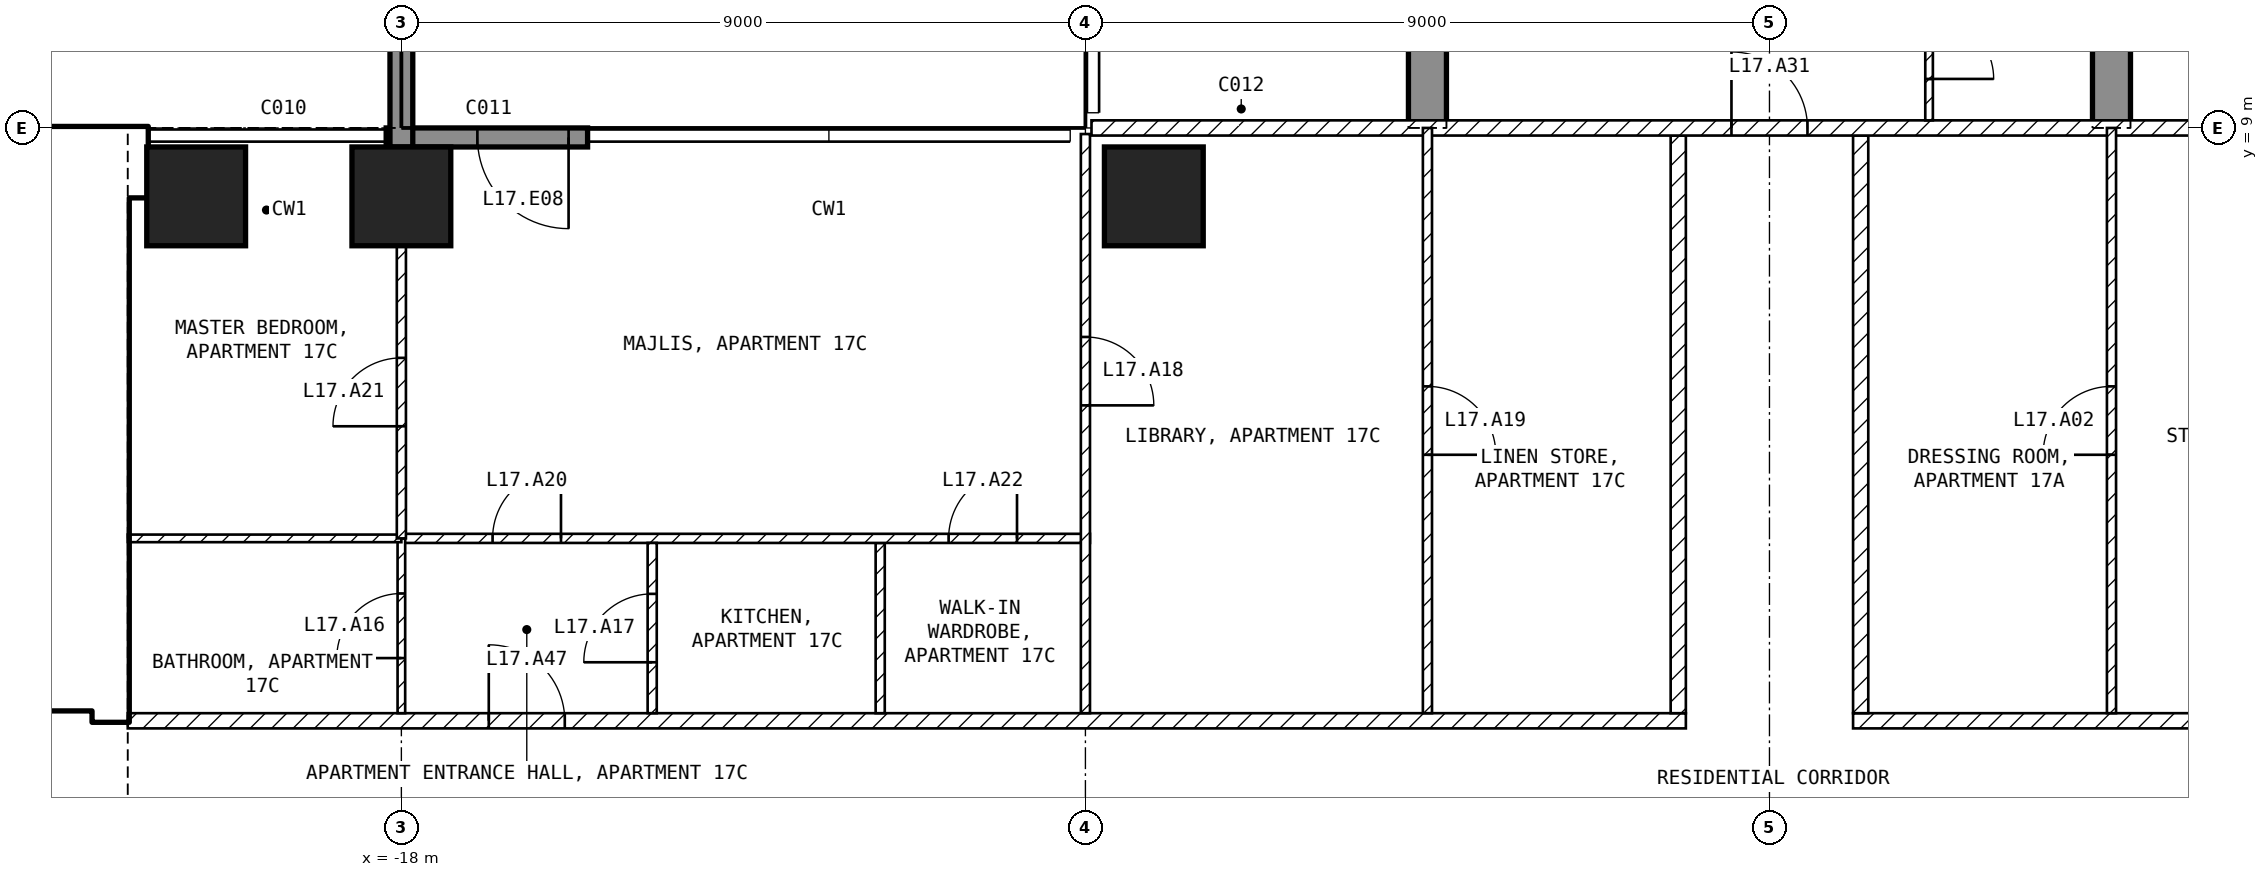
"""IFC4 building model, lengths in metres.
Left out: names, types, materials, properties, quantities, classifications, styles, units other than length and angle.
Written with IfcOpenShell. Run it as: python <this file> out.ifc"""

import sys

from ifc_helpers import new_model, si_unit, direction, frame, frame_2d, origin, origin_2d, place, context, subcontext, project, spatial, polyline, rectangle, outline, extrude, element, fill, save


model = new_model("IFC4")
c1 = context("Model", 3, precision=1e-05, world=origin(), true_north=direction((0.0, 1.0)))
c2 = subcontext(c1, "Body", "Model", "MODEL_VIEW")
j1 = project(units=[si_unit("LENGTHUNIT", "METRE"), si_unit("PLANEANGLEUNIT", "RADIAN")], contexts=[c1])
p1 = place(None, origin())
s1 = spatial("IfcSite", under=j1, at=p1, CompositionType="ELEMENT")
p2 = place(p1, origin())
s2 = spatial("IfcBuilding", under=s1, at=p2, CompositionType="ELEMENT")
p3 = place(p2, frame((0.0, 0.0, 78.5)))
s3 = spatial("IfcBuildingStorey", under=s2, at=p3, CompositionType="ELEMENT", Elevation=78.5)
for number, where, z_axis, x_axis in (
    (1, (-20.7, 8.1, -0.25), (0.0, 0.0, 1.0), (1.0, 0.0, 0.0)),
    (2, (-18.0, 8.1, -0.25), (0.0, 0.0, 1.0), (1.0, 0.0, 0.0)),
    (3, (-8.1, 8.1, -0.25), (0.0, 0.0, 1.0), (1.0, 0.0, 0.0)),
):
    element("IfcColumn", number, at=place(p3, frame(where, z_axis=z_axis, x_axis=x_axis)), inside=s3, PredefinedType="COLUMN", context=c2, shape_type="SweptSolid", body=[
        extrude(rectangle(XDim=1.3, YDim=1.3, at=origin_2d()), origin(), (0.0, 0.0, 1.0), 3.5),
    ])
for number, where, z_axis, x_axis in (
    (4, (-4.75, 9.0, -0.25), (1.0, 0.0, 0.0), (0.0, 1.0, 0.0)),
    (5, (4.25, 9.0, -0.25), (1.0, 0.0, 0.0), (0.0, 1.0, 0.0)),
):
    element("IfcWall", number, at=place(p3, frame(where, z_axis=z_axis, x_axis=x_axis)), inside=s3, PredefinedType="SHEAR", context=c2, shape_type="SweptSolid", body=[
        extrude(outline(polyline([(0.0, 0.0), (2.1, 0.0), (2.1, 2.65), (4.5, 2.65), (4.5, 0.0), (9.9, 0.0), (9.9, 2.65), (12.3, 2.65), (12.3, 0.0), (16.45, 0.0), (16.45, 3.5), (0.0, 3.5), (0.0, 0.0)])), origin(), (0.0, 0.0, 1.0), 0.5),
    ])
p4 = place(p3, frame((-15.55, 8.875, 0.0), z_axis=(0.0, 0.0, 1.0), x_axis=(-1.0, 0.0, 0.0)))
e6 = element("IfcWall", 6, at=p4, inside=s3, PredefinedType="SOLIDWALL", context=c2, shape_type="SweptSolid", body=[
    extrude(rectangle(XDim=2.65, YDim=0.25, at=frame_2d((1.325, 0.0))), origin(), (0.0, 0.0, 1.0), 3.25),
])
p5 = place(p4, frame((0.25, 0.0, 0.0)))
e7 = element("IfcOpeningElement", 7, at=p5, cuts=e6, PredefinedType="OPENING", context=c2, shape_type="SweptSolid", body=[
    extrude(rectangle(XDim=1.2, YDim=2.4, at=frame_2d((0.6, 1.2))), frame((0.0, 0.135, 0.0), z_axis=(0.0, -1.0, 0.0), x_axis=(1.0, 0.0, 0.0)), (0.0, 0.0, 1.0), 0.27),
])
p6 = place(p3, frame((-18.0, 8.75, 0.0), z_axis=(0.0, 0.0, 1.0), x_axis=(0.0, 1.0, 0.0)))
e8 = element("IfcWall", 8, at=p6, inside=s3, PredefinedType="SOLIDWALL", context=c2, shape_type="SweptSolid", body=[
    extrude(rectangle(XDim=2.95, YDim=0.3, at=frame_2d((1.475, 0.0))), origin(), (0.0, 0.0, 1.0), 3.25),
])
p7 = place(p3, frame((-31.5, 8.55, 0.0), z_axis=(0.0, 0.0, 1.0), x_axis=(1.0, 0.0, 0.0)))
e9 = element("IfcWall", 9, at=p7, inside=s3, PredefinedType="SHEAR", context=c2, shape_type="SweptSolid", body=[
    extrude(rectangle(XDim=10.15, YDim=0.9, at=frame_2d((5.075, 0.0))), origin(), (0.0, 0.0, 1.0), 3.25),
])
p8 = place(p3, frame((-21.825, 1.2, 0.0), z_axis=(0.0, 0.0, 1.0), x_axis=(0.0, 1.0, 0.0)))
e10 = element("IfcWall", 10, at=p8, inside=s3, PredefinedType="SHEAR", context=c2, shape_type="SweptSolid", body=[
    extrude(rectangle(XDim=6.9, YDim=0.45, at=frame_2d((3.45, 0.0))), origin(), (0.0, 0.0, 1.0), 3.25),
])
p9 = place(p3, frame((-35.1, 1.45, 0.0), z_axis=(0.0, 0.0, 1.0), x_axis=(1.0, 0.0, 0.0)))
e11 = element("IfcWall", 11, at=p9, inside=s3, PredefinedType="SOLIDWALL", context=c2, shape_type="SweptSolid", body=[
    extrude(rectangle(XDim=13.05, YDim=0.2, at=frame_2d((6.525, 0.0))), origin(), (0.0, 0.0, 1.0), 3.25),
])
p10 = place(p9, frame((11.3, 0.0, 0.0)))
e12 = element("IfcOpeningElement", 12, at=p10, cuts=e11, PredefinedType="OPENING", context=c2, shape_type="SweptSolid", body=[
    extrude(rectangle(XDim=1.0, YDim=2.1, at=frame_2d((0.5, 1.05))), frame((0.0, 0.11, 0.0), z_axis=(0.0, -1.0, 0.0), x_axis=(1.0, 0.0, 0.0)), (0.0, 0.0, 1.0), 0.22),
])
p11 = place(p9, frame((8.8, 0.0, 0.0)))
e13 = element("IfcOpeningElement", 13, at=p11, cuts=e11, PredefinedType="OPENING", context=c2, shape_type="SweptSolid", body=[
    extrude(rectangle(XDim=1.0, YDim=2.1, at=frame_2d((0.5, 1.05))), frame((0.0, 0.11, 0.0), z_axis=(0.0, -1.0, 0.0), x_axis=(1.0, 0.0, 0.0)), (0.0, 0.0, 1.0), 0.22),
])
p12 = place(p3, frame((-28.35, 5.15, 0.0), z_axis=(0.0, 0.0, 1.0), x_axis=(1.0, 0.0, 0.0)))
e14 = element("IfcWall", 14, at=p12, inside=s3, PredefinedType="SOLIDWALL", context=c2, shape_type="SweptSolid", body=[
    extrude(rectangle(XDim=6.3, YDim=0.2, at=frame_2d((3.15, 0.0))), origin(), (0.0, 0.0, 1.0), 3.25),
])
p13 = place(p12, frame((5.1, 0.0, 0.0)))
e15 = element("IfcOpeningElement", 15, at=p13, cuts=e14, PredefinedType="OPENING", context=c2, shape_type="SweptSolid", body=[
    extrude(rectangle(XDim=1.0, YDim=2.1, at=frame_2d((0.5, 1.05))), frame((0.0, 0.11, 0.0), z_axis=(0.0, -1.0, 0.0), x_axis=(1.0, 0.0, 0.0)), (0.0, 0.0, 1.0), 0.22),
])
p14 = place(p3, frame((1.1, 1.2, 0.0), z_axis=(0.0, 0.0, 1.0), x_axis=(1.0, 0.0, 0.0)))
e16 = element("IfcWall", 16, at=p14, inside=s3, PredefinedType="PARTITIONING", context=c2, shape_type="SweptSolid", body=[
    extrude(rectangle(XDim=20.5, YDim=0.2, at=frame_2d((10.25, 0.0))), origin(), (0.0, 0.0, 1.0), 3.25),
])
p15 = place(p14, frame((11.6, 0.0, 0.0)))
e17 = element("IfcOpeningElement", 17, at=p15, cuts=e16, PredefinedType="OPENING", context=c2, shape_type="SweptSolid", body=[
    extrude(rectangle(XDim=1.0, YDim=2.1, at=frame_2d((0.5, 1.05))), frame((0.0, 0.11, 0.0), z_axis=(0.0, -1.0, 0.0), x_axis=(1.0, 0.0, 0.0)), (0.0, 0.0, 1.0), 0.22),
])
p16 = place(p3, frame((1.2, 8.9, 0.0), z_axis=(0.0, 0.0, 1.0), x_axis=(0.0, -1.0, 0.0)))
e18 = element("IfcWall", 18, at=p16, inside=s3, PredefinedType="PARTITIONING", context=c2, shape_type="SweptSolid", body=[
    extrude(rectangle(XDim=7.6, YDim=0.2, at=frame_2d((3.8, 0.0))), origin(), (0.0, 0.0, 1.0), 3.25),
])
p17 = place(p3, frame((-21.6, 1.2, 0.0), z_axis=(0.0, 0.0, 1.0), x_axis=(1.0, 0.0, 0.0)))
e19 = element("IfcWall", 19, at=p17, inside=s3, PredefinedType="PARTITIONING", context=c2, shape_type="SweptSolid", body=[
    extrude(rectangle(XDim=20.5, YDim=0.2, at=frame_2d((10.25, 0.0))), origin(), (0.0, 0.0, 1.0), 3.25),
])
p18 = place(p17, frame((4.75, 0.0, 0.0)))
e20 = element("IfcOpeningElement", 20, at=p18, cuts=e19, PredefinedType="OPENING", context=c2, shape_type="SweptSolid", body=[
    extrude(rectangle(XDim=1.0, YDim=2.1, at=frame_2d((0.5, 1.05))), frame((0.0, 0.11, 0.0), z_axis=(0.0, -1.0, 0.0), x_axis=(1.0, 0.0, 0.0)), (0.0, 0.0, 1.0), 0.22),
])
p19 = place(p3, frame((-1.2, 1.3, 0.0), z_axis=(0.0, 0.0, 1.0), x_axis=(0.0, 1.0, 0.0)))
e21 = element("IfcWall", 21, at=p19, inside=s3, PredefinedType="PARTITIONING", context=c2, shape_type="SweptSolid", body=[
    extrude(rectangle(XDim=7.6, YDim=0.2, at=frame_2d((3.8, 0.0))), origin(), (0.0, 0.0, 1.0), 3.25),
])
p20 = place(p3, frame((-8.92, 9.0, 0.0), z_axis=(0.0, 0.0, 1.0), x_axis=(1.0, 0.0, 0.0)))
e22 = element("IfcWall", 22, at=p20, inside=s3, PredefinedType="PARTITIONING", context=c2, shape_type="SweptSolid", body=[
    extrude(rectangle(XDim=17.84, YDim=0.2, at=frame_2d((8.92, 0.0))), origin(), (0.0, 0.0, 1.0), 3.25),
])
p21 = place(p20, frame((8.42, 0.0, 0.0)))
e23 = element("IfcOpeningElement", 23, at=p21, cuts=e22, PredefinedType="OPENING", context=c2, shape_type="SweptSolid", body=[
    extrude(rectangle(XDim=1.0, YDim=2.1, at=frame_2d((0.5, 1.05))), frame((0.0, 0.11, 0.0), z_axis=(0.0, -1.0, 0.0), x_axis=(1.0, 0.0, 0.0)), (0.0, 0.0, 1.0), 0.22),
])
p22 = place(p3, frame((4.5, 1.3, 0.0), z_axis=(0.0, 0.0, 1.0), x_axis=(0.0, 1.0, 0.0)))
e24 = element("IfcWall", 24, at=p22, inside=s3, PredefinedType="PARTITIONING", context=c2, shape_type="SweptSolid", body=[
    extrude(rectangle(XDim=7.7, YDim=0.12, at=frame_2d((3.85, 0.0))), origin(), (0.0, 0.0, 1.0), 3.25),
])
p23 = place(p22, frame((3.4, 0.0, 0.0)))
e25 = element("IfcOpeningElement", 25, at=p23, cuts=e24, PredefinedType="OPENING", context=c2, shape_type="SweptSolid", body=[
    extrude(rectangle(XDim=0.9, YDim=2.1, at=frame_2d((0.45, 1.05))), frame((0.0, 0.07, 0.0), z_axis=(0.0, -1.0, 0.0), x_axis=(1.0, 0.0, 0.0)), (0.0, 0.0, 1.0), 0.14),
])
p24 = place(p3, frame((-11.7, 1.3, 0.0), z_axis=(0.0, 0.0, 1.0), x_axis=(0.0, 1.0, 0.0)))
e26 = element("IfcWall", 26, at=p24, inside=s3, PredefinedType="PARTITIONING", context=c2, shape_type="SweptSolid", body=[
    extrude(rectangle(XDim=2.24, YDim=0.12, at=frame_2d((1.12, 0.0))), origin(), (0.0, 0.0, 1.0), 3.25),
])
p25 = place(p3, frame((-18.0, 3.6, 0.0), z_axis=(0.0, 0.0, 1.0), x_axis=(1.0, 0.0, 0.0)))
e27 = element("IfcWall", 27, at=p25, inside=s3, PredefinedType="PARTITIONING", context=c2, shape_type="SweptSolid", body=[
    extrude(rectangle(XDim=9.06, YDim=0.12, at=frame_2d((4.53, 0.0))), origin(), (0.0, 0.0, 1.0), 3.25),
])
p26 = place(p25, frame((1.2, 0.0, 0.0)))
e28 = element("IfcOpeningElement", 28, at=p26, cuts=e27, PredefinedType="OPENING", context=c2, shape_type="SweptSolid", body=[
    extrude(rectangle(XDim=0.9, YDim=2.1, at=frame_2d((0.45, 1.05))), frame((0.0, 0.07, 0.0), z_axis=(0.0, -1.0, 0.0), x_axis=(1.0, 0.0, 0.0)), (0.0, 0.0, 1.0), 0.14),
])
p27 = place(p25, frame((7.2, 0.0, 0.0)))
e29 = element("IfcOpeningElement", 29, at=p27, cuts=e27, PredefinedType="OPENING", context=c2, shape_type="SweptSolid", body=[
    extrude(rectangle(XDim=0.9, YDim=2.1, at=frame_2d((0.45, 1.05))), frame((0.0, 0.07, 0.0), z_axis=(0.0, -1.0, 0.0), x_axis=(1.0, 0.0, 0.0)), (0.0, 0.0, 1.0), 0.14),
])
p28 = place(p3, frame((-9.0, 8.92, 0.0), z_axis=(0.0, 0.0, 1.0), x_axis=(0.0, -1.0, 0.0)))
e30 = element("IfcWall", 30, at=p28, inside=s3, PredefinedType="PARTITIONING", context=c2, shape_type="SweptSolid", body=[
    extrude(rectangle(XDim=7.62, YDim=0.12, at=frame_2d((3.81, 0.0))), origin(), (0.0, 0.0, 1.0), 3.25),
])
p29 = place(p28, frame((2.67, 0.0, 0.0)))
e31 = element("IfcOpeningElement", 31, at=p29, cuts=e30, PredefinedType="OPENING", context=c2, shape_type="SweptSolid", body=[
    extrude(rectangle(XDim=0.9, YDim=2.1, at=frame_2d((0.45, 1.05))), frame((0.0, 0.07, 0.0), z_axis=(0.0, -1.0, 0.0), x_axis=(1.0, 0.0, 0.0)), (0.0, 0.0, 1.0), 0.14),
])
p30 = place(p3, frame((-14.7, 1.3, 0.0), z_axis=(0.0, 0.0, 1.0), x_axis=(0.0, 1.0, 0.0)))
e32 = element("IfcWall", 32, at=p30, inside=s3, PredefinedType="PARTITIONING", context=c2, shape_type="SweptSolid", body=[
    extrude(rectangle(XDim=2.24, YDim=0.12, at=frame_2d((1.12, 0.0))), origin(), (0.0, 0.0, 1.0), 3.25),
])
p31 = place(p30, frame((0.67, 0.0, 0.0)))
e33 = element("IfcOpeningElement", 33, at=p31, cuts=e32, PredefinedType="OPENING", context=c2, shape_type="SweptSolid", body=[
    extrude(rectangle(XDim=0.9, YDim=2.1, at=frame_2d((0.45, 1.05))), frame((0.0, 0.07, 0.0), z_axis=(0.0, -1.0, 0.0), x_axis=(1.0, 0.0, 0.0)), (0.0, 0.0, 1.0), 0.14),
])
p32 = place(p3, frame((-18.0, 1.3, 0.0), z_axis=(0.0, 0.0, 1.0), x_axis=(0.0, 1.0, 0.0)))
e34 = element("IfcWall", 34, at=p32, inside=s3, PredefinedType="PARTITIONING", context=c2, shape_type="SweptSolid", body=[
    extrude(rectangle(XDim=2.3, YDim=0.1, at=frame_2d((1.15, 0.0))), origin(), (0.0, 0.0, 1.0), 2.346),
])
p33 = place(p32, frame((0.725, 0.0, 0.0)))
e35 = element("IfcOpeningElement", 35, at=p33, cuts=e34, PredefinedType="OPENING", context=c2, shape_type="SweptSolid", body=[
    extrude(rectangle(XDim=0.85, YDim=2.1, at=frame_2d((0.425, 1.05))), frame((0.0, 0.06, 0.0), z_axis=(0.0, -1.0, 0.0), x_axis=(1.0, 0.0, 0.0)), (0.0, 0.0, 1.0), 0.12),
])
p34 = place(p3, frame((-21.6, 3.6, 0.0), z_axis=(0.0, 0.0, 1.0), x_axis=(1.0, 0.0, 0.0)))
e36 = element("IfcWall", 36, at=p34, inside=s3, PredefinedType="PARTITIONING", context=c2, shape_type="SweptSolid", body=[
    extrude(rectangle(XDim=3.6, YDim=0.1, at=frame_2d((1.8, 0.0))), origin(), (0.0, 0.0, 1.0), 3.25),
])
p35 = place(p3, frame((-18.0, 3.6, 0.0), z_axis=(0.0, 0.0, 1.0), x_axis=(0.0, 1.0, 0.0)))
e37 = element("IfcWall", 37, at=p35, inside=s3, PredefinedType="PARTITIONING", context=c2, shape_type="SweptSolid", body=[
    extrude(rectangle(XDim=3.85, YDim=0.12, at=frame_2d((1.925, 0.0))), origin(), (0.0, 0.0, 1.0), 2.346),
])
p36 = place(p35, frame((1.475, 0.0, 0.0)))
e38 = element("IfcOpeningElement", 38, at=p36, cuts=e37, PredefinedType="OPENING", context=c2, shape_type="SweptSolid", body=[
    extrude(rectangle(XDim=0.9, YDim=2.1, at=frame_2d((0.45, 1.05))), frame((0.0, 0.07, 0.0), z_axis=(0.0, -1.0, 0.0), x_axis=(1.0, 0.0, 0.0)), (0.0, 0.0, 1.0), 0.14),
])
p37 = place(p3, frame((-4.5, 9.0, 0.0), z_axis=(0.0, 0.0, 1.0), x_axis=(0.0, -1.0, 0.0)))
e39 = element("IfcWall", 39, at=p37, inside=s3, PredefinedType="PARTITIONING", context=c2, shape_type="SweptSolid", body=[
    extrude(rectangle(XDim=7.7, YDim=0.12, at=frame_2d((3.85, 0.0))), origin(), (0.0, 0.0, 1.0), 3.25),
])
p38 = place(p37, frame((3.4, 0.0, 0.0)))
e40 = element("IfcOpeningElement", 40, at=p38, cuts=e39, PredefinedType="OPENING", context=c2, shape_type="SweptSolid", body=[
    extrude(rectangle(XDim=0.9, YDim=2.1, at=frame_2d((0.45, 1.05))), frame((0.0, 0.07, 0.0), z_axis=(0.0, -1.0, 0.0), x_axis=(1.0, 0.0, 0.0)), (0.0, 0.0, 1.0), 0.14),
])
p39 = place(p3, frame((2.1, 11.04, 0.0), z_axis=(0.0, 0.0, 1.0), x_axis=(0.0, -1.0, 0.0)))
e41 = element("IfcWall", 41, at=p39, inside=s3, PredefinedType="PARTITIONING", context=c2, shape_type="SweptSolid", body=[
    extrude(rectangle(XDim=1.94, YDim=0.1, at=frame_2d((0.97, 0.0))), origin(), (0.0, 0.0, 1.0), 3.25),
])
p40 = place(p39, frame((0.545, 0.0, 0.0)))
e42 = element("IfcOpeningElement", 42, at=p40, cuts=e41, PredefinedType="OPENING", context=c2, shape_type="SweptSolid", body=[
    extrude(rectangle(XDim=0.85, YDim=2.1, at=frame_2d((0.425, 1.05))), frame((0.0, 0.06, 0.0), z_axis=(0.0, -1.0, 0.0), x_axis=(1.0, 0.0, 0.0)), (0.0, 0.0, 1.0), 0.12),
])
p41 = place(p5, origin())
e43 = element("IfcDoor", 43, at=p41, inside=s3, OperationType="SINGLE_SWING_LEFT", PredefinedType="DOOR", context=c2, shape_type="SweptSolid", body=[
    extrude(rectangle(XDim=1.2, YDim=2.4, at=frame_2d((0.6, 1.2))), frame((0.0, 0.025, 0.0), z_axis=(0.0, -1.0, 0.0), x_axis=(1.0, 0.0, 0.0)), (0.0, 0.0, 1.0), 0.05),
])
fill(e7, e43)
p42 = place(p13, origin())
e44 = element("IfcDoor", 44, at=p42, inside=s3, OperationType="SINGLE_SWING_LEFT", PredefinedType="DOOR", context=c2, shape_type="SweptSolid", body=[
    extrude(rectangle(XDim=1.0, YDim=2.1, at=frame_2d((0.5, 1.05))), frame((0.0, 0.025, 0.0), z_axis=(0.0, -1.0, 0.0), x_axis=(1.0, 0.0, 0.0)), (0.0, 0.0, 1.0), 0.05),
])
fill(e15, e44)
p43 = place(p23, origin())
e45 = element("IfcDoor", 45, at=p43, inside=s3, OperationType="SINGLE_SWING_LEFT", PredefinedType="DOOR", context=c2, shape_type="SweptSolid", body=[
    extrude(rectangle(XDim=0.9, YDim=2.1, at=frame_2d((0.45, 1.05))), frame((0.0, 0.025, 0.0), z_axis=(0.0, -1.0, 0.0), x_axis=(1.0, 0.0, 0.0)), (0.0, 0.0, 1.0), 0.05),
])
fill(e25, e45)
p44 = place(p33, origin())
e46 = element("IfcDoor", 46, at=p44, inside=s3, OperationType="SINGLE_SWING_LEFT", PredefinedType="DOOR", context=c2, shape_type="SweptSolid", body=[
    extrude(rectangle(XDim=0.85, YDim=2.1, at=frame_2d((0.425, 1.05))), frame((0.0, 0.025, 0.0), z_axis=(0.0, -1.0, 0.0), x_axis=(1.0, 0.0, 0.0)), (0.0, 0.0, 1.0), 0.05),
])
fill(e35, e46)
p45 = place(p31, origin())
e47 = element("IfcDoor", 47, at=p45, inside=s3, OperationType="SINGLE_SWING_LEFT", PredefinedType="DOOR", context=c2, shape_type="SweptSolid", body=[
    extrude(rectangle(XDim=0.9, YDim=2.1, at=frame_2d((0.45, 1.05))), frame((0.0, 0.025, 0.0), z_axis=(0.0, -1.0, 0.0), x_axis=(1.0, 0.0, 0.0)), (0.0, 0.0, 1.0), 0.05),
])
fill(e33, e47)
p46 = place(p29, origin())
e48 = element("IfcDoor", 48, at=p46, inside=s3, OperationType="SINGLE_SWING_RIGHT", PredefinedType="DOOR", context=c2, shape_type="SweptSolid", body=[
    extrude(rectangle(XDim=0.9, YDim=2.1, at=frame_2d((0.45, 1.05))), frame((0.0, 0.025, 0.0), z_axis=(0.0, -1.0, 0.0), x_axis=(1.0, 0.0, 0.0)), (0.0, 0.0, 1.0), 0.05),
])
fill(e31, e48)
p47 = place(p38, origin())
e49 = element("IfcDoor", 49, at=p47, inside=s3, OperationType="SINGLE_SWING_RIGHT", PredefinedType="DOOR", context=c2, shape_type="SweptSolid", body=[
    extrude(rectangle(XDim=0.9, YDim=2.1, at=frame_2d((0.45, 1.05))), frame((0.0, 0.025, 0.0), z_axis=(0.0, -1.0, 0.0), x_axis=(1.0, 0.0, 0.0)), (0.0, 0.0, 1.0), 0.05),
])
fill(e40, e49)
p48 = place(p26, origin())
e50 = element("IfcDoor", 50, at=p48, inside=s3, OperationType="SINGLE_SWING_RIGHT", PredefinedType="DOOR", context=c2, shape_type="SweptSolid", body=[
    extrude(rectangle(XDim=0.9, YDim=2.1, at=frame_2d((0.45, 1.05))), frame((0.0, 0.025, 0.0), z_axis=(0.0, -1.0, 0.0), x_axis=(1.0, 0.0, 0.0)), (0.0, 0.0, 1.0), 0.05),
])
fill(e28, e50)
p49 = place(p36, origin())
e51 = element("IfcDoor", 51, at=p49, inside=s3, OperationType="SINGLE_SWING_LEFT", PredefinedType="DOOR", context=c2, shape_type="SweptSolid", body=[
    extrude(rectangle(XDim=0.9, YDim=2.1, at=frame_2d((0.45, 1.05))), frame((0.0, 0.025, 0.0), z_axis=(0.0, -1.0, 0.0), x_axis=(1.0, 0.0, 0.0)), (0.0, 0.0, 1.0), 0.05),
])
fill(e38, e51)
p50 = place(p27, origin())
e52 = element("IfcDoor", 52, at=p50, inside=s3, OperationType="SINGLE_SWING_RIGHT", PredefinedType="DOOR", context=c2, shape_type="SweptSolid", body=[
    extrude(rectangle(XDim=0.9, YDim=2.1, at=frame_2d((0.45, 1.05))), frame((0.0, 0.025, 0.0), z_axis=(0.0, -1.0, 0.0), x_axis=(1.0, 0.0, 0.0)), (0.0, 0.0, 1.0), 0.05),
])
fill(e29, e52)
p51 = place(p21, origin())
e53 = element("IfcDoor", 53, at=p51, inside=s3, OperationType="SINGLE_SWING_LEFT", PredefinedType="DOOR", context=c2, shape_type="SweptSolid", body=[
    extrude(rectangle(XDim=1.0, YDim=2.1, at=frame_2d((0.5, 1.05))), frame((0.0, 0.025, 0.0), z_axis=(0.0, -1.0, 0.0), x_axis=(1.0, 0.0, 0.0)), (0.0, 0.0, 1.0), 0.05),
])
fill(e23, e53)
p52 = place(p40, origin())
e54 = element("IfcDoor", 54, at=p52, inside=s3, OperationType="SINGLE_SWING_RIGHT", PredefinedType="DOOR", context=c2, shape_type="SweptSolid", body=[
    extrude(rectangle(XDim=0.85, YDim=2.1, at=frame_2d((0.425, 1.05))), frame((0.0, 0.025, 0.0), z_axis=(0.0, -1.0, 0.0), x_axis=(1.0, 0.0, 0.0)), (0.0, 0.0, 1.0), 0.05),
])
fill(e42, e54)
p53 = place(p18, origin())
e55 = element("IfcDoor", 55, at=p53, inside=s3, OperationType="SINGLE_SWING_LEFT", PredefinedType="DOOR", context=c2, shape_type="SweptSolid", body=[
    extrude(rectangle(XDim=1.0, YDim=2.1, at=frame_2d((0.5, 1.05))), frame((0.0, 0.025, 0.0), z_axis=(0.0, -1.0, 0.0), x_axis=(1.0, 0.0, 0.0)), (0.0, 0.0, 1.0), 0.05),
])
fill(e20, e55)
save(model, sys.argv[1])
